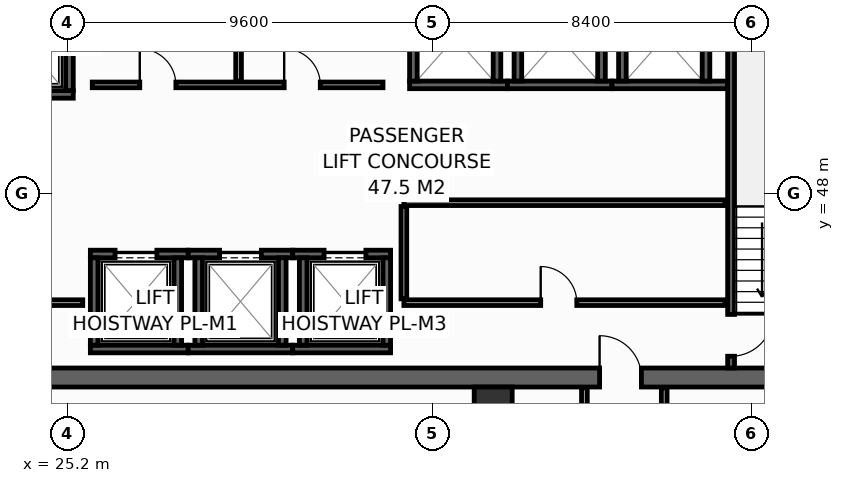
"""IFC4 building model, lengths in metres.
Left out: names, types, materials, properties, quantities, classifications, styles, units other than length and angle.
Written with IfcOpenShell. Run it as: python <this file> out.ifc"""

import sys

from ifc_helpers import new_model, si_unit, direction, frame, frame_2d, origin, origin_2d, place, context, subcontext, project, spatial, rectangle, hollow_rectangle, extrude, element, fill, save


model = new_model("IFC4")
c1 = context("Model", 3, precision=1e-05, world=origin(), true_north=direction((0.0, 1.0)))
c2 = subcontext(c1, "Body", "Model", "MODEL_VIEW")
j1 = project(units=[si_unit("LENGTHUNIT", "METRE"), si_unit("PLANEANGLEUNIT", "RADIAN")], contexts=[c1])
p1 = place(None, origin())
s1 = spatial("IfcSite", under=j1, at=p1, CompositionType="ELEMENT")
p2 = place(p1, origin())
s2 = spatial("IfcBuilding", under=s1, at=p2, CompositionType="ELEMENT")
p3 = place(p2, frame((0.0, 0.0, 152.4)))
s3 = spatial("IfcBuildingStorey", under=s2, at=p3, CompositionType="ELEMENT", Elevation=152.4)
p4 = place(p3, frame((13.6, 43.15, 0.0), z_axis=(0.0, 0.0, 1.0), x_axis=(1.0, 0.0, 0.0)))
e1 = element("IfcWall", 1, at=p4, inside=s3, PredefinedType="SHEAR", context=c2, shape_type="SweptSolid", body=[
    extrude(rectangle(XDim=32.7, YDim=0.5, at=frame_2d((16.35, 0.0))), origin(), (0.0, 0.0, 1.0), 3.55),
])
p5 = place(p4, frame((5.4, 0.0, 0.0)))
e2 = element("IfcOpeningElement", 2, at=p5, cuts=e1, PredefinedType="OPENING", context=c2, shape_type="SweptSolid", body=[
    extrude(rectangle(XDim=1.1, YDim=2.15, at=frame_2d((0.55, 1.075))), frame((0.0, 0.26, 0.0), z_axis=(0.0, -1.0, 0.0), x_axis=(1.0, 0.0, 0.0)), (0.0, 0.0, 1.0), 0.52),
])
p6 = place(p4, frame((25.6, 0.0, 0.0)))
e3 = element("IfcOpeningElement", 3, at=p6, cuts=e1, PredefinedType="OPENING", context=c2, shape_type="SweptSolid", body=[
    extrude(rectangle(XDim=1.1, YDim=2.15, at=frame_2d((0.55, 1.075))), frame((0.0, 0.26, 0.0), z_axis=(0.0, -1.0, 0.0), x_axis=(1.0, 0.0, 0.0)), (0.0, 0.0, 1.0), 0.52),
])
p7 = place(p3, frame((36.4, 42.4, 0.0), z_axis=(0.0, 0.0, 1.0), x_axis=(1.0, 0.0, 0.0)))
e4 = element("IfcColumn", 4, at=p7, inside=s3, PredefinedType="COLUMN", context=c2, shape_type="SweptSolid", body=[
    extrude(hollow_rectangle(XDim=1.0, YDim=1.0, WallThickness=0.045, at=origin_2d()), origin(), (0.0, 0.0, 1.0), 3.8),
])
p8 = place(p3, frame((22.5, 50.6, 0.0), z_axis=(0.0, 0.0, 1.0), x_axis=(1.0, 0.0, 0.0)))
e5 = element("IfcWall", 5, at=p8, inside=s3, PredefinedType="SHEAR", context=c2, shape_type="SweptSolid", body=[
    extrude(rectangle(XDim=2.85, YDim=0.2, at=frame_2d((1.425, 0.0))), origin(), (0.0, 0.0, 1.0), 3.55),
])
p9 = place(p8, frame((0.925, 0.0, 0.0)))
e6 = element("IfcOpeningElement", 6, at=p9, cuts=e5, PredefinedType="OPENING", context=c2, shape_type="SweptSolid", body=[
    extrude(rectangle(XDim=1.25, YDim=2.3, at=frame_2d((0.625, 1.15))), frame((0.0, 0.11, 0.0), z_axis=(0.0, -1.0, 0.0), x_axis=(1.0, 0.0, 0.0)), (0.0, 0.0, 1.0), 0.22),
])
p10 = place(p3, frame((25.25, 50.7, 0.0), z_axis=(0.0, 0.0, 1.0), x_axis=(0.0, 1.0, 0.0)))
e7 = element("IfcWall", 7, at=p10, inside=s3, PredefinedType="SHEAR", context=c2, shape_type="SweptSolid", body=[
    extrude(rectangle(XDim=2.6, YDim=0.2, at=frame_2d((1.3, 0.0))), origin(), (0.0, 0.0, 1.0), 3.55),
])
p11 = place(p3, frame((25.8, 43.9, 0.0), z_axis=(0.0, 0.0, 1.0), x_axis=(1.0, 0.0, 0.0)))
e8 = element("IfcWall", 8, at=p11, inside=s3, PredefinedType="SHEAR", context=c2, shape_type="SweptSolid", body=[
    extrude(rectangle(XDim=2.575, YDim=0.2, at=frame_2d((1.288, 0.0))), origin(), (0.0, 0.0, 1.0), 3.55),
])
p12 = place(p3, frame((25.8, 46.4, 0.0), z_axis=(0.0, 0.0, 1.0), x_axis=(1.0, 0.0, 0.0)))
e9 = element("IfcWall", 9, at=p12, inside=s3, PredefinedType="SHEAR", context=c2, shape_type="SweptSolid", body=[
    extrude(rectangle(XDim=2.575, YDim=0.2, at=frame_2d((1.288, 0.0))), origin(), (0.0, 0.0, 1.0), 3.55),
])
p13 = place(p12, frame((0.65, 0.0, 0.0)))
e10 = element("IfcOpeningElement", 10, at=p13, cuts=e9, PredefinedType="OPENING", context=c2, shape_type="SweptSolid", body=[
    extrude(rectangle(XDim=1.1, YDim=2.2, at=frame_2d((0.55, 1.1))), frame((0.0, 0.11, 0.0), z_axis=(0.0, -1.0, 0.0), x_axis=(1.0, 0.0, 0.0)), (0.0, 0.0, 1.0), 0.22),
])
for number, where, z_axis, x_axis in (
    (11, (25.9, 44.0, 0.0), (0.0, 0.0, 1.0), (0.0, 1.0, 0.0)),
    (12, (28.1, 44.0, 0.0), (0.0, 0.0, 1.0), (0.0, 1.0, 0.0)),
):
    element("IfcWall", number, at=place(p3, frame(where, z_axis=z_axis, x_axis=x_axis)), inside=s3, PredefinedType="SHEAR", context=c2, shape_type="SweptSolid", body=[
        extrude(rectangle(XDim=2.3, YDim=0.2, at=frame_2d((1.15, 0.0))), origin(), (0.0, 0.0, 1.0), 3.55),
    ])
p14 = place(p3, frame((28.375, 43.9, 0.0), z_axis=(0.0, 0.0, 1.0), x_axis=(1.0, 0.0, 0.0)))
e13 = element("IfcWall", 13, at=p14, inside=s3, PredefinedType="SHEAR", context=c2, shape_type="SweptSolid", body=[
    extrude(rectangle(XDim=2.75, YDim=0.2, at=frame_2d((1.375, 0.0))), origin(), (0.0, 0.0, 1.0), 3.55),
])
p15 = place(p3, frame((28.375, 46.4, 0.0), z_axis=(0.0, 0.0, 1.0), x_axis=(1.0, 0.0, 0.0)))
e14 = element("IfcWall", 14, at=p15, inside=s3, PredefinedType="SHEAR", context=c2, shape_type="SweptSolid", body=[
    extrude(rectangle(XDim=2.75, YDim=0.2, at=frame_2d((1.375, 0.0))), origin(), (0.0, 0.0, 1.0), 3.55),
])
p16 = place(p15, frame((0.825, 0.0, 0.0)))
e15 = element("IfcOpeningElement", 15, at=p16, cuts=e14, PredefinedType="OPENING", context=c2, shape_type="SweptSolid", body=[
    extrude(rectangle(XDim=1.1, YDim=2.2, at=frame_2d((0.55, 1.1))), frame((0.0, 0.11, 0.0), z_axis=(0.0, -1.0, 0.0), x_axis=(1.0, 0.0, 0.0)), (0.0, 0.0, 1.0), 0.22),
])
for number, where, z_axis, x_axis in (
    (16, (28.65, 44.0, 0.0), (0.0, 0.0, 1.0), (0.0, 1.0, 0.0)),
    (17, (30.85, 44.0, 0.0), (0.0, 0.0, 1.0), (0.0, 1.0, 0.0)),
):
    element("IfcWall", number, at=place(p3, frame(where, z_axis=z_axis, x_axis=x_axis)), inside=s3, PredefinedType="SHEAR", context=c2, shape_type="SweptSolid", body=[
        extrude(rectangle(XDim=2.3, YDim=0.2, at=frame_2d((1.15, 0.0))), origin(), (0.0, 0.0, 1.0), 3.55),
    ])
p17 = place(p3, frame((31.125, 43.9, 0.0), z_axis=(0.0, 0.0, 1.0), x_axis=(1.0, 0.0, 0.0)))
e18 = element("IfcWall", 18, at=p17, inside=s3, PredefinedType="SHEAR", context=c2, shape_type="SweptSolid", body=[
    extrude(rectangle(XDim=2.575, YDim=0.2, at=frame_2d((1.288, 0.0))), origin(), (0.0, 0.0, 1.0), 3.55),
])
p18 = place(p3, frame((31.125, 46.4, 0.0), z_axis=(0.0, 0.0, 1.0), x_axis=(1.0, 0.0, 0.0)))
e19 = element("IfcWall", 19, at=p18, inside=s3, PredefinedType="SHEAR", context=c2, shape_type="SweptSolid", body=[
    extrude(rectangle(XDim=2.575, YDim=0.2, at=frame_2d((1.288, 0.0))), origin(), (0.0, 0.0, 1.0), 3.55),
])
p19 = place(p18, frame((0.825, 0.0, 0.0)))
e20 = element("IfcOpeningElement", 20, at=p19, cuts=e19, PredefinedType="OPENING", context=c2, shape_type="SweptSolid", body=[
    extrude(rectangle(XDim=1.1, YDim=2.2, at=frame_2d((0.55, 1.1))), frame((0.0, 0.11, 0.0), z_axis=(0.0, -1.0, 0.0), x_axis=(1.0, 0.0, 0.0)), (0.0, 0.0, 1.0), 0.22),
])
for number, where, z_axis, x_axis in (
    (21, (31.4, 44.0, 0.0), (0.0, 0.0, 1.0), (0.0, 1.0, 0.0)),
    (22, (33.6, 44.0, 0.0), (0.0, 0.0, 1.0), (0.0, 1.0, 0.0)),
):
    element("IfcWall", number, at=place(p3, frame(where, z_axis=z_axis, x_axis=x_axis)), inside=s3, PredefinedType="SHEAR", context=c2, shape_type="SweptSolid", body=[
        extrude(rectangle(XDim=2.3, YDim=0.2, at=frame_2d((1.15, 0.0))), origin(), (0.0, 0.0, 1.0), 3.55),
    ])
p20 = place(p3, frame((34.2, 50.85, 0.0), z_axis=(0.0, 0.0, 1.0), x_axis=(1.0, 0.0, 0.0)))
e23 = element("IfcWall", 23, at=p20, inside=s3, PredefinedType="SHEAR", context=c2, shape_type="SweptSolid", body=[
    extrude(rectangle(XDim=2.575, YDim=0.2, at=frame_2d((1.288, 0.0))), origin(), (0.0, 0.0, 1.0), 3.55),
])
for number, where, z_axis, x_axis in (
    (24, (34.3, 50.95, 0.0), (0.0, 0.0, 1.0), (0.0, 1.0, 0.0)),
    (25, (36.5, 50.95, 0.0), (0.0, 0.0, 1.0), (0.0, 1.0, 0.0)),
):
    element("IfcWall", number, at=place(p3, frame(where, z_axis=z_axis, x_axis=x_axis)), inside=s3, PredefinedType="SHEAR", context=c2, shape_type="SweptSolid", body=[
        extrude(rectangle(XDim=2.3, YDim=0.2, at=frame_2d((1.15, 0.0))), origin(), (0.0, 0.0, 1.0), 3.55),
    ])
p21 = place(p3, frame((36.775, 50.85, 0.0), z_axis=(0.0, 0.0, 1.0), x_axis=(1.0, 0.0, 0.0)))
e26 = element("IfcWall", 26, at=p21, inside=s3, PredefinedType="SHEAR", context=c2, shape_type="SweptSolid", body=[
    extrude(rectangle(XDim=2.75, YDim=0.2, at=frame_2d((1.375, 0.0))), origin(), (0.0, 0.0, 1.0), 3.55),
])
for number, where, z_axis, x_axis in (
    (27, (37.05, 50.95, 0.0), (0.0, 0.0, 1.0), (0.0, 1.0, 0.0)),
    (28, (39.25, 50.95, 0.0), (0.0, 0.0, 1.0), (0.0, 1.0, 0.0)),
):
    element("IfcWall", number, at=place(p3, frame(where, z_axis=z_axis, x_axis=x_axis)), inside=s3, PredefinedType="SHEAR", context=c2, shape_type="SweptSolid", body=[
        extrude(rectangle(XDim=2.3, YDim=0.2, at=frame_2d((1.15, 0.0))), origin(), (0.0, 0.0, 1.0), 3.55),
    ])
p22 = place(p3, frame((39.525, 50.85, 0.0), z_axis=(0.0, 0.0, 1.0), x_axis=(1.0, 0.0, 0.0)))
e29 = element("IfcWall", 29, at=p22, inside=s3, PredefinedType="SHEAR", context=c2, shape_type="SweptSolid", body=[
    extrude(rectangle(XDim=3.045, YDim=0.2, at=frame_2d((1.522, 0.0))), origin(), (0.0, 0.0, 1.0), 3.55),
])
for number, where, z_axis, x_axis in (
    (30, (39.8, 50.95, 0.0), (0.0, 0.0, 1.0), (0.0, 1.0, 0.0)),
    (31, (42.0, 50.95, 0.0), (0.0, 0.0, 1.0), (0.0, 1.0, 0.0)),
):
    element("IfcWall", number, at=place(p3, frame(where, z_axis=z_axis, x_axis=x_axis)), inside=s3, PredefinedType="SHEAR", context=c2, shape_type="SweptSolid", body=[
        extrude(rectangle(XDim=2.3, YDim=0.2, at=frame_2d((1.15, 0.0))), origin(), (0.0, 0.0, 1.0), 3.55),
    ])
p23 = place(p3, frame((42.66, 53.8, 0.0), z_axis=(0.0, 0.0, 1.0), x_axis=(0.0, -1.0, 0.0)))
e32 = element("IfcWall", 32, at=p23, inside=s3, PredefinedType="SHEAR", context=c2, shape_type="SweptSolid", body=[
    extrude(rectangle(XDim=10.4, YDim=0.18, at=frame_2d((5.2, 0.0))), origin(), (0.0, 0.0, 1.0), 3.55),
])
p24 = place(p23, frame((8.99, 0.0, 0.0)))
e33 = element("IfcOpeningElement", 33, at=p24, cuts=e32, PredefinedType="OPENING", context=c2, shape_type="SweptSolid", body=[
    extrude(rectangle(XDim=1.1, YDim=2.15, at=frame_2d((0.55, 1.075))), frame((0.0, 0.1, 0.0), z_axis=(0.0, -1.0, 0.0), x_axis=(1.0, 0.0, 0.0)), (0.0, 0.0, 1.0), 0.2),
])
p25 = place(p3, frame((22.68, 45.12, 0.0), z_axis=(0.0, 0.0, 1.0), x_axis=(1.0, 0.0, 0.0)))
e34 = element("IfcWall", 34, at=p25, inside=s3, PredefinedType="PARTITIONING", context=c2, shape_type="SweptSolid", body=[
    extrude(rectangle(XDim=2.92, YDim=0.15, at=frame_2d((1.46, 0.0))), origin(), (0.0, 0.0, 1.0), 3.55),
])
p26 = place(p25, frame((0.85, 0.0, 0.0)))
e35 = element("IfcOpeningElement", 35, at=p26, cuts=e34, PredefinedType="OPENING", context=c2, shape_type="SweptSolid", body=[
    extrude(rectangle(XDim=1.1, YDim=2.15, at=frame_2d((0.55, 1.075))), frame((0.0, 0.085, 0.0), z_axis=(0.0, -1.0, 0.0), x_axis=(1.0, 0.0, 0.0)), (0.0, 0.0, 1.0), 0.17),
])
p27 = place(p3, frame((34.05, 45.12, 0.0), z_axis=(0.0, 0.0, 1.0), x_axis=(1.0, 0.0, 0.0)))
e36 = element("IfcWall", 36, at=p27, inside=s3, PredefinedType="PARTITIONING", context=c2, shape_type="SweptSolid", body=[
    extrude(rectangle(XDim=8.45, YDim=0.15, at=frame_2d((4.225, 0.0))), origin(), (0.0, 0.0, 1.0), 3.55),
])
p28 = place(p27, frame((3.6, 0.0, 0.0)))
e37 = element("IfcOpeningElement", 37, at=p28, cuts=e36, PredefinedType="OPENING", context=c2, shape_type="SweptSolid", body=[
    extrude(rectangle(XDim=0.95, YDim=2.15, at=frame_2d((0.475, 1.075))), frame((0.0, 0.085, 0.0), z_axis=(0.0, -1.0, 0.0), x_axis=(1.0, 0.0, 0.0)), (0.0, 0.0, 1.0), 0.17),
])
p29 = place(p3, frame((34.05, 47.75, 0.0), z_axis=(0.0, 0.0, 1.0), x_axis=(1.0, 0.0, 0.0)))
e38 = element("IfcWall", 38, at=p29, inside=s3, PredefinedType="PARTITIONING", context=c2, shape_type="SweptSolid", body=[
    extrude(rectangle(XDim=8.45, YDim=0.15, at=frame_2d((4.225, 0.0))), origin(), (0.0, 0.0, 1.0), 3.55),
])
p30 = place(p3, frame((34.05, 45.22, 0.0), z_axis=(0.0, 0.0, 1.0), x_axis=(0.0, 1.0, 0.0)))
e39 = element("IfcWall", 39, at=p30, inside=s3, PredefinedType="PARTITIONING", context=c2, shape_type="SweptSolid", body=[
    extrude(rectangle(XDim=2.43, YDim=0.15, at=frame_2d((1.215, 0.0))), origin(), (0.0, 0.0, 1.0), 3.55),
])
p31 = place(p3, frame((25.85, 50.85, 0.0), z_axis=(0.0, 0.0, 1.0), x_axis=(1.0, 0.0, 0.0)))
e40 = element("IfcWall", 40, at=p31, inside=s3, PredefinedType="PARTITIONING", context=c2, shape_type="SweptSolid", body=[
    extrude(rectangle(XDim=7.65, YDim=0.15, at=frame_2d((3.825, 0.0))), origin(), (0.0, 0.0, 1.0), 3.55),
])
p32 = place(p31, frame((1.25, 0.0, 0.0)))
e41 = element("IfcOpeningElement", 41, at=p32, cuts=e40, PredefinedType="OPENING", context=c2, shape_type="SweptSolid", body=[
    extrude(rectangle(XDim=0.95, YDim=2.15, at=frame_2d((0.475, 1.075))), frame((0.0, 0.085, 0.0), z_axis=(0.0, -1.0, 0.0), x_axis=(1.0, 0.0, 0.0)), (0.0, 0.0, 1.0), 0.17),
])
p33 = place(p31, frame((5.05, 0.0, 0.0)))
e42 = element("IfcOpeningElement", 42, at=p33, cuts=e40, PredefinedType="OPENING", context=c2, shape_type="SweptSolid", body=[
    extrude(rectangle(XDim=0.95, YDim=2.15, at=frame_2d((0.475, 1.075))), frame((0.0, 0.085, 0.0), z_axis=(0.0, -1.0, 0.0), x_axis=(1.0, 0.0, 0.0)), (0.0, 0.0, 1.0), 0.17),
])
p34 = place(p3, frame((29.7, 50.95, 0.0), z_axis=(0.0, 0.0, 1.0), x_axis=(0.0, 1.0, 0.0)))
e43 = element("IfcWall", 43, at=p34, inside=s3, PredefinedType="PARTITIONING", context=c2, shape_type="SweptSolid", body=[
    extrude(rectangle(XDim=2.7, YDim=0.15, at=frame_2d((1.35, 0.0))), origin(), (0.0, 0.0, 1.0), 3.55),
])
for number, where, z_axis, x_axis in (
    (44, (38.8, 41.15, 0.0), (0.0, 0.0, 1.0), (0.0, 1.0, 0.0)),
    (45, (40.9, 41.15, 0.0), (0.0, 0.0, 1.0), (0.0, 1.0, 0.0)),
):
    element("IfcWall", number, at=place(p3, frame(where, z_axis=z_axis, x_axis=x_axis)), inside=s3, PredefinedType="PARTITIONING", context=c2, shape_type="SweptSolid", body=[
        extrude(rectangle(XDim=1.73, YDim=0.15, at=frame_2d((0.865, 0.0))), origin(), (0.0, 0.0, 1.0), 3.55),
    ])
p35 = place(p13, origin())
e46 = element("IfcDoor", 46, at=p35, inside=s3, OperationType="SLIDING_TO_LEFT", PredefinedType="DOOR", context=c2, shape_type="SweptSolid", body=[
    extrude(rectangle(XDim=1.1, YDim=2.2, at=frame_2d((0.55, 1.1))), frame((0.0, 0.025, 0.0), z_axis=(0.0, -1.0, 0.0), x_axis=(1.0, 0.0, 0.0)), (0.0, 0.0, 1.0), 0.05),
])
fill(e10, e46)
p36 = place(p16, origin())
e47 = element("IfcDoor", 47, at=p36, inside=s3, OperationType="SLIDING_TO_LEFT", PredefinedType="DOOR", context=c2, shape_type="SweptSolid", body=[
    extrude(rectangle(XDim=1.1, YDim=2.2, at=frame_2d((0.55, 1.1))), frame((0.0, 0.025, 0.0), z_axis=(0.0, -1.0, 0.0), x_axis=(1.0, 0.0, 0.0)), (0.0, 0.0, 1.0), 0.05),
])
fill(e15, e47)
p37 = place(p19, origin())
e48 = element("IfcDoor", 48, at=p37, inside=s3, OperationType="SLIDING_TO_LEFT", PredefinedType="DOOR", context=c2, shape_type="SweptSolid", body=[
    extrude(rectangle(XDim=1.1, YDim=2.2, at=frame_2d((0.55, 1.1))), frame((0.0, 0.025, 0.0), z_axis=(0.0, -1.0, 0.0), x_axis=(1.0, 0.0, 0.0)), (0.0, 0.0, 1.0), 0.05),
])
fill(e20, e48)
p38 = place(p24, origin())
e49 = element("IfcDoor", 49, at=p38, inside=s3, OperationType="SINGLE_SWING_LEFT", PredefinedType="DOOR", context=c2, shape_type="SweptSolid", body=[
    extrude(rectangle(XDim=1.1, YDim=2.15, at=frame_2d((0.55, 1.075))), frame((0.0, 0.025, 0.0), z_axis=(0.0, -1.0, 0.0), x_axis=(1.0, 0.0, 0.0)), (0.0, 0.0, 1.0), 0.05),
])
fill(e33, e49)
p39 = place(p6, origin())
e50 = element("IfcDoor", 50, at=p39, inside=s3, OperationType="SINGLE_SWING_LEFT", PredefinedType="DOOR", context=c2, shape_type="SweptSolid", body=[
    extrude(rectangle(XDim=1.1, YDim=2.15, at=frame_2d((0.55, 1.075))), frame((0.0, 0.025, 0.0), z_axis=(0.0, -1.0, 0.0), x_axis=(1.0, 0.0, 0.0)), (0.0, 0.0, 1.0), 0.05),
])
fill(e3, e50)
p40 = place(p28, origin())
e51 = element("IfcDoor", 51, at=p40, inside=s3, OperationType="SINGLE_SWING_LEFT", PredefinedType="DOOR", context=c2, shape_type="SweptSolid", body=[
    extrude(rectangle(XDim=0.95, YDim=2.15, at=frame_2d((0.475, 1.075))), frame((0.0, 0.025, 0.0), z_axis=(0.0, -1.0, 0.0), x_axis=(1.0, 0.0, 0.0)), (0.0, 0.0, 1.0), 0.05),
])
fill(e37, e51)
p41 = place(p32, origin())
e52 = element("IfcDoor", 52, at=p41, inside=s3, OperationType="SINGLE_SWING_LEFT", PredefinedType="DOOR", context=c2, shape_type="SweptSolid", body=[
    extrude(rectangle(XDim=0.95, YDim=2.15, at=frame_2d((0.475, 1.075))), frame((0.0, 0.025, 0.0), z_axis=(0.0, -1.0, 0.0), x_axis=(1.0, 0.0, 0.0)), (0.0, 0.0, 1.0), 0.05),
])
fill(e41, e52)
p42 = place(p33, origin())
e53 = element("IfcDoor", 53, at=p42, inside=s3, OperationType="SINGLE_SWING_LEFT", PredefinedType="DOOR", context=c2, shape_type="SweptSolid", body=[
    extrude(rectangle(XDim=0.95, YDim=2.15, at=frame_2d((0.475, 1.075))), frame((0.0, 0.025, 0.0), z_axis=(0.0, -1.0, 0.0), x_axis=(1.0, 0.0, 0.0)), (0.0, 0.0, 1.0), 0.05),
])
fill(e42, e53)
save(model, sys.argv[1])
